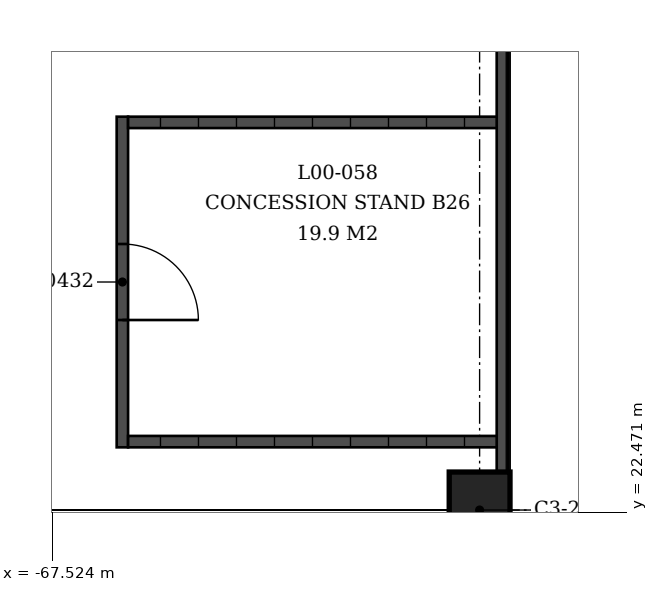
"""IFC4 building model, lengths in metres.
Left out: names, types, materials, properties, quantities, classifications, styles, units other than length and angle.
Written with IfcOpenShell. Run it as: python <this file> out.ifc"""

import sys

from ifc_helpers import new_model, si_unit, direction, frame, frame_2d, origin, origin_2d, place, context, subcontext, project, spatial, rectangle, extrude, element, fill, save


model = new_model("IFC4")
c1 = context("Model", 3, precision=1e-05, world=origin(), true_north=direction((0.0, 1.0)))
c2 = subcontext(c1, "Body", "Model", "MODEL_VIEW")
j1 = project(units=[si_unit("LENGTHUNIT", "METRE"), si_unit("PLANEANGLEUNIT", "RADIAN")], contexts=[c1])
p1 = place(None, origin())
s1 = spatial("IfcSite", under=j1, at=p1, CompositionType="ELEMENT")
p2 = place(p1, origin())
s2 = spatial("IfcBuilding", under=s1, at=p2, CompositionType="ELEMENT")
p3 = place(p2, origin())
s3 = spatial("IfcBuildingStorey", under=s2, at=p3, CompositionType="ELEMENT", Elevation=0.0)
p4 = place(p3, frame((-61.9, 22.5, 0.0), z_axis=(0.0, 0.0, 1.0), x_axis=(0.0, -1.0, 0.0)))
e1 = element("IfcColumn", 1, at=p4, inside=s3, PredefinedType="COLUMN", context=c2, shape_type="SweptSolid", body=[
    extrude(rectangle(XDim=1.0, YDim=0.8, at=origin_2d()), origin(), (0.0, 0.0, 1.0), 4.5),
])
p5 = place(p3, frame((-66.6, 23.325, 0.0), z_axis=(0.0, 0.0, 1.0), x_axis=(0.0, 1.0, 0.0)))
e2 = element("IfcWall", 2, at=p5, inside=s3, PredefinedType="SOLIDWALL", context=c2, shape_type="SweptSolid", body=[
    extrude(rectangle(XDim=4.35, YDim=0.15, at=frame_2d((2.175, 0.0))), origin(), (0.0, 0.0, 1.0), 3.0),
])
p6 = place(p5, frame((1.675, 0.0, 0.0)))
e3 = element("IfcOpeningElement", 3, at=p6, cuts=e2, PredefinedType="OPENING", context=c2, shape_type="SweptSolid", body=[
    extrude(rectangle(XDim=1.0, YDim=2.1, at=frame_2d((0.5, 1.05))), frame((0.0, 0.075, 0.0), z_axis=(0.0, -1.0, 0.0), x_axis=(1.0, 0.0, 0.0)), (0.0, 0.0, 1.0), 0.15),
])
for number, where, z_axis, x_axis in (
    (4, (-61.6, 23.4, 0.0), (0.0, 0.0, 1.0), (-1.0, 0.0, 0.0)),
    (5, (-61.6, 27.6, 0.0), (0.0, 0.0, 1.0), (-1.0, 0.0, 0.0)),
):
    element("IfcWall", number, at=place(p3, frame(where, z_axis=z_axis, x_axis=x_axis)), inside=s3, PredefinedType="SOLIDWALL", context=c2, shape_type="SweptSolid", body=[
        extrude(rectangle(XDim=4.925, YDim=0.15, at=frame_2d((2.462, 0.0))), origin(), (0.0, 0.0, 1.0), 3.0),
    ])
p7 = place(p3, frame((-61.6, 23.0, 0.0), z_axis=(0.0, 0.0, 1.0), x_axis=(0.0, 1.0, 0.0)))
e6 = element("IfcWall", 6, at=p7, inside=s3, PredefinedType="SOLIDWALL", context=c2, shape_type="SweptSolid", body=[
    extrude(rectangle(XDim=14.1, YDim=0.15, at=frame_2d((7.05, 0.0))), origin(), (0.0, 0.0, 1.0), 3.0),
])
p8 = place(p6, origin())
e7 = element("IfcDoor", 7, at=p8, inside=s3, OperationType="SINGLE_SWING_LEFT", PredefinedType="DOOR", context=c2, shape_type="SweptSolid", body=[
    extrude(rectangle(XDim=1.0, YDim=2.1, at=frame_2d((0.5, 1.05))), frame((0.0, 0.025, 0.0), z_axis=(0.0, -1.0, 0.0), x_axis=(1.0, 0.0, 0.0)), (0.0, 0.0, 1.0), 0.05),
])
fill(e3, e7)
save(model, sys.argv[1])
